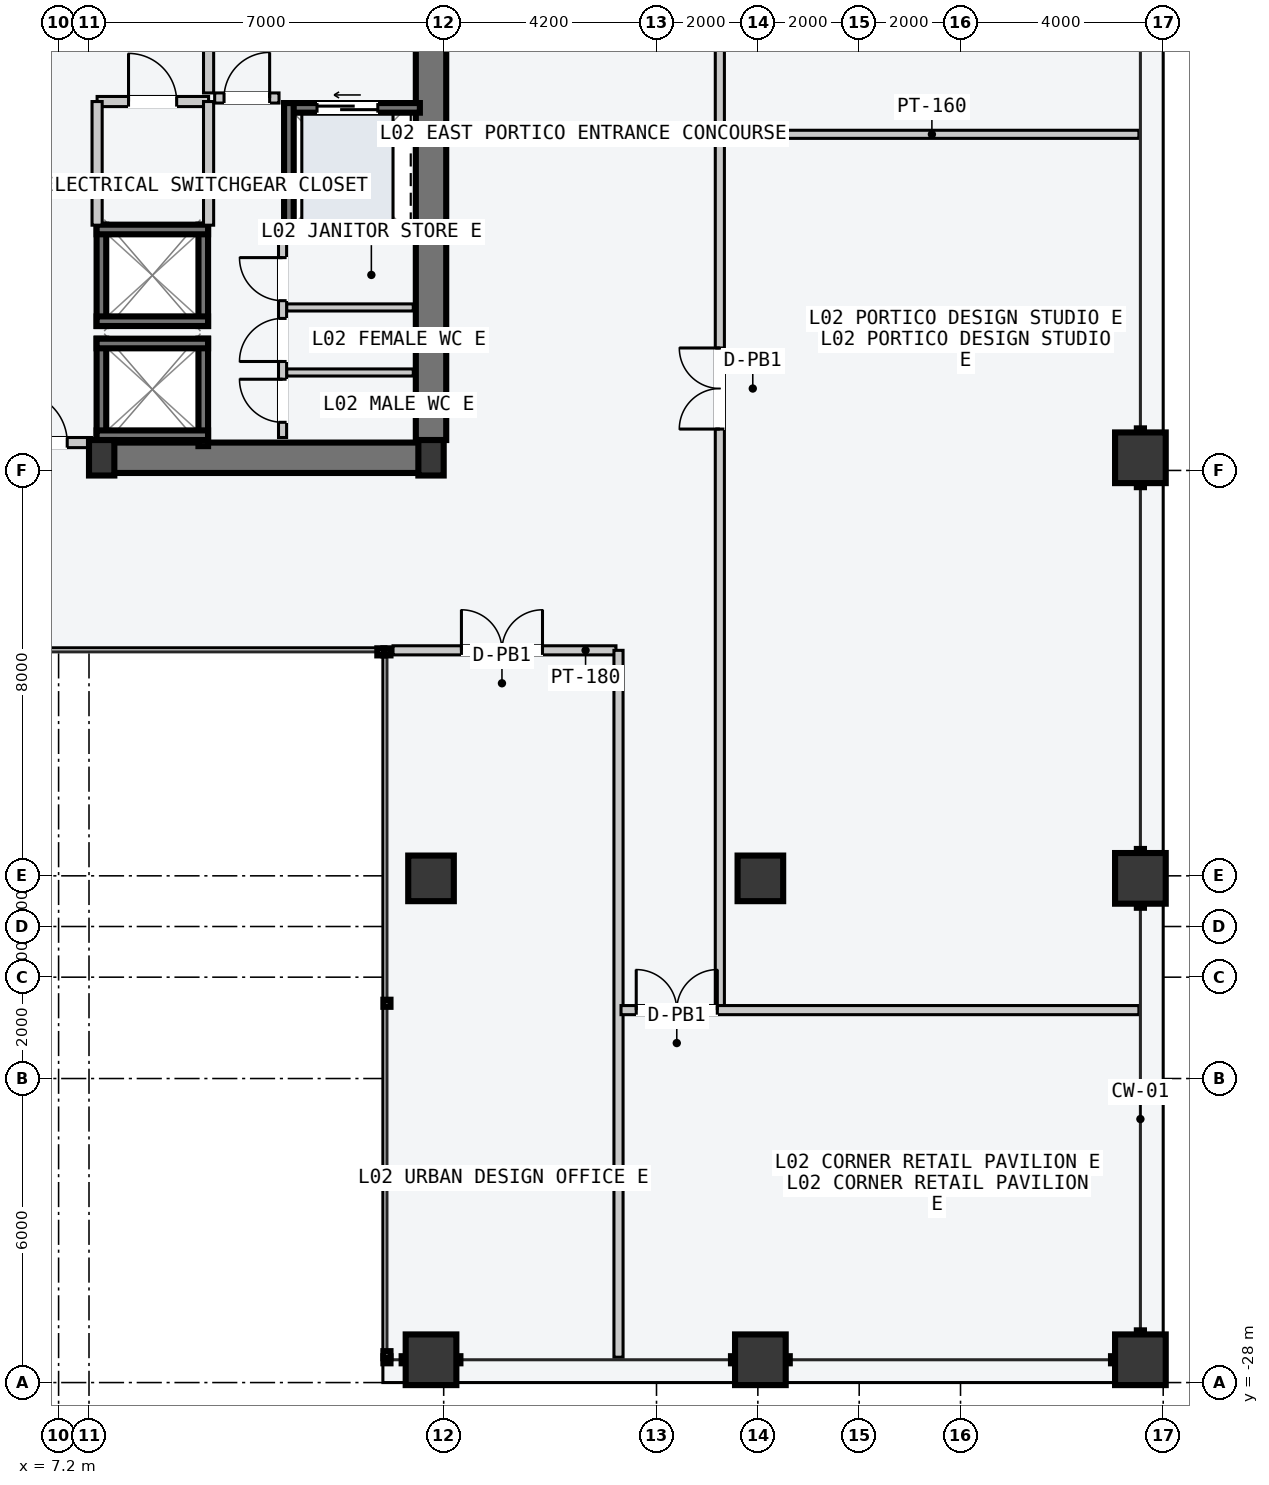
"""IFC4 building model, lengths in metres.
Left out: names, types, materials, properties, quantities, classifications, styles, units other than length and angle.
Written with IfcOpenShell. Run it as: python <this file> out.ifc"""

import sys

from ifc_helpers import new_model, si_unit, direction, frame, frame_2d, origin, origin_2d, place, context, subcontext, project, spatial, rectangle, hollow_rectangle, i_section, extrude, element, fill, save


model = new_model("IFC4")
c1 = context("Model", 3, precision=1e-05, world=origin(), true_north=direction((0.0, 1.0)))
c2 = subcontext(c1, "Body", "Model", "MODEL_VIEW")
j1 = project(units=[si_unit("LENGTHUNIT", "METRE"), si_unit("PLANEANGLEUNIT", "RADIAN")], contexts=[c1])
p1 = place(None, origin())
s1 = spatial("IfcSite", under=j1, at=p1, CompositionType="ELEMENT")
p2 = place(p1, origin())
s2 = spatial("IfcBuilding", under=s1, at=p2, CompositionType="ELEMENT")
p3 = place(p2, frame((0.0, 0.0, 9.6)))
s3 = spatial("IfcBuildingStorey", under=s2, at=p3, CompositionType="ELEMENT", Elevation=9.6)
p4 = place(p3, frame((8.07, -9.75, -0.22), z_axis=(0.0, 0.0, 1.0), x_axis=(1.0, 0.0, 0.0)))
e1 = element("IfcWall", 1, at=p4, inside=s3, PredefinedType="SHEAR", context=c2, shape_type="SweptSolid", body=[
    extrude(rectangle(XDim=6.46, YDim=0.6, at=frame_2d((3.23, 0.0))), origin(), (0.0, 0.0, 1.0), 4.8),
])
p5 = place(p3, frame((14.55, -9.4, -0.22), z_axis=(0.0, 0.0, 1.0), x_axis=(0.0, 1.0, 0.0)))
e2 = element("IfcWall", 2, at=p5, inside=s3, PredefinedType="SHEAR", context=c2, shape_type="SweptSolid", body=[
    extrude(rectangle(XDim=9.05, YDim=0.6, at=frame_2d((4.525, 0.0))), origin(), (0.0, 0.0, 1.0), 4.8),
])
for number, where, z_axis, x_axis in (
    (3, (8.05, -9.75, 0.0), (0.0, 0.0, 1.0), (1.0, 0.0, 0.0)),
    (4, (14.55, -9.75, 0.0), (0.0, 0.0, 1.0), (1.0, 0.0, 0.0)),
):
    element("IfcColumn", number, at=place(p3, frame(where, z_axis=z_axis, x_axis=x_axis)), inside=s3, PredefinedType="COLUMN", context=c2, shape_type="SweptSolid", body=[
        extrude(i_section(OverallWidth=0.5, OverallDepth=0.7, WebThickness=0.028, FlangeThickness=0.045, at=origin_2d()), origin(), (0.0, 0.0, 1.0), 4.8),
    ])
for number, where, z_axis, x_axis in (
    (5, (14.55, -18.05, 0.0), (0.0, 0.0, 1.0), (1.0, 0.0, 0.0)),
    (6, (21.05, -18.05, 0.0), (0.0, 0.0, 1.0), (1.0, 0.0, 0.0)),
):
    element("IfcColumn", number, at=place(p3, frame(where, z_axis=z_axis, x_axis=x_axis)), inside=s3, PredefinedType="COLUMN", context=c2, shape_type="SweptSolid", body=[
        extrude(hollow_rectangle(XDim=0.9, YDim=0.9, WallThickness=0.045, at=origin_2d()), origin(), (0.0, 0.0, 1.0), 4.8),
    ])
for number, where, z_axis, x_axis in (
    (7, (14.55, -27.55, 0.0), (0.0, 0.0, 1.0), (1.0, 0.0, 0.0)),
    (8, (21.05, -27.55, 0.0), (0.0, 0.0, 1.0), (1.0, 0.0, 0.0)),
    (9, (28.55, -27.55, 0.0), (0.0, 0.0, 1.0), (1.0, 0.0, 0.0)),
    (10, (28.55, -18.05, 0.0), (0.0, 0.0, 1.0), (0.0, 1.0, 0.0)),
    (11, (28.55, -9.75, 0.0), (0.0, 0.0, 1.0), (0.0, 1.0, 0.0)),
):
    element("IfcColumn", number, at=place(p3, frame(where, z_axis=z_axis, x_axis=x_axis)), inside=s3, PredefinedType="COLUMN", context=c2, shape_type="SweptSolid", body=[
        extrude(hollow_rectangle(XDim=1.0, YDim=1.0, WallThickness=0.05, at=origin_2d()), origin(), (0.0, 0.0, 1.0), 4.8),
    ])
for number, where, z_axis, x_axis in (
    (12, (8.045, -9.52, -0.22), (0.0, 0.0, 1.0), (0.0, 1.0, 0.0)),
    (13, (10.055, -9.52, -0.22), (0.0, 0.0, 1.0), (0.0, 1.0, 0.0)),
):
    element("IfcWall", number, at=place(p3, frame(where, z_axis=z_axis, x_axis=x_axis)), inside=s3, PredefinedType="SOLIDWALL", context=c2, shape_type="SweptSolid", body=[
        extrude(rectangle(XDim=2.12, YDim=0.19, at=frame_2d((1.06, 0.0))), origin(), (0.0, 0.0, 1.0), 4.8),
    ])
for number, where, z_axis, x_axis in (
    (14, (7.95, -7.495, -0.22), (0.0, 0.0, 1.0), (1.0, 0.0, 0.0)),
    (15, (7.95, -9.305, -0.22), (0.0, 0.0, 1.0), (1.0, 0.0, 0.0)),
):
    element("IfcWall", number, at=place(p3, frame(where, z_axis=z_axis, x_axis=x_axis)), inside=s3, PredefinedType="SOLIDWALL", context=c2, shape_type="SweptSolid", body=[
        extrude(rectangle(XDim=2.2, YDim=0.19, at=frame_2d((1.1, 0.0))), origin(), (0.0, 0.0, 1.0), 4.8),
    ])
for number, where, z_axis, x_axis in (
    (16, (8.045, -7.15, -0.22), (0.0, 0.0, 1.0), (0.0, 1.0, 0.0)),
    (17, (10.055, -7.15, -0.22), (0.0, 0.0, 1.0), (0.0, 1.0, 0.0)),
):
    element("IfcWall", number, at=place(p3, frame(where, z_axis=z_axis, x_axis=x_axis)), inside=s3, PredefinedType="SOLIDWALL", context=c2, shape_type="SweptSolid", body=[
        extrude(rectangle(XDim=2.0, YDim=0.19, at=frame_2d((1.0, 0.0))), origin(), (0.0, 0.0, 1.0), 4.8),
    ])
for number, where, z_axis, x_axis in (
    (18, (7.95, -5.245, -0.22), (0.0, 0.0, 1.0), (1.0, 0.0, 0.0)),
    (19, (7.95, -7.055, -0.22), (0.0, 0.0, 1.0), (1.0, 0.0, 0.0)),
):
    element("IfcWall", number, at=place(p3, frame(where, z_axis=z_axis, x_axis=x_axis)), inside=s3, PredefinedType="SOLIDWALL", context=c2, shape_type="SweptSolid", body=[
        extrude(rectangle(XDim=2.2, YDim=0.19, at=frame_2d((1.1, 0.0))), origin(), (0.0, 0.0, 1.0), 4.8),
    ])
p6 = place(p3, frame((11.65, -2.845, -0.22), z_axis=(0.0, 0.0, 1.0), x_axis=(1.0, 0.0, 0.0)))
e20 = element("IfcWall", 20, at=p6, inside=s3, PredefinedType="SOLIDWALL", context=c2, shape_type="SweptSolid", body=[
    extrude(rectangle(XDim=2.68, YDim=0.19, at=frame_2d((1.34, 0.0))), origin(), (0.0, 0.0, 1.0), 4.8),
])
p7 = place(p6, frame((0.65, 0.0, 0.22)))
e21 = element("IfcOpeningElement", 21, at=p7, cuts=e20, PredefinedType="OPENING", context=c2, shape_type="SweptSolid", body=[
    extrude(rectangle(XDim=1.2, YDim=2.2, at=frame_2d((0.6, 1.1))), frame((0.0, 0.105, 0.0), z_axis=(0.0, -1.0, 0.0), x_axis=(1.0, 0.0, 0.0)), (0.0, 0.0, 1.0), 0.21),
])
p8 = place(p3, frame((11.65, -5.255, -0.22), z_axis=(0.0, 0.0, 1.0), x_axis=(1.0, 0.0, 0.0)))
e22 = element("IfcWall", 22, at=p8, inside=s3, PredefinedType="SOLIDWALL", context=c2, shape_type="SweptSolid", body=[
    extrude(rectangle(XDim=2.68, YDim=0.19, at=frame_2d((1.34, 0.0))), origin(), (0.0, 0.0, 1.0), 4.8),
])
p9 = place(p3, frame((11.745, -5.35, -0.22), z_axis=(0.0, 0.0, 1.0), x_axis=(0.0, 1.0, 0.0)))
e23 = element("IfcWall", 23, at=p9, inside=s3, PredefinedType="SOLIDWALL", context=c2, shape_type="SweptSolid", body=[
    extrude(rectangle(XDim=2.6, YDim=0.19, at=frame_2d((1.3, 0.0))), origin(), (0.0, 0.0, 1.0), 4.8),
])
p10 = place(p3, frame((10.16, -2.55, 0.0), z_axis=(0.0, 0.0, 1.0), x_axis=(0.0, 1.0, 0.0)))
e24 = element("IfcWall", 24, at=p10, inside=s3, PredefinedType="PARTITIONING", context=c2, shape_type="SweptSolid", body=[
    extrude(rectangle(XDim=3.4, YDim=0.2, at=frame_2d((1.7, 0.0))), origin(), (0.0, 0.0, 1.0), 4.58),
])
p11 = place(p10, frame((1.3, 0.0, 0.0)))
e25 = element("IfcOpeningElement", 25, at=p11, cuts=e24, PredefinedType="OPENING", context=c2, shape_type="SweptSolid", body=[
    extrude(rectangle(XDim=1.1, YDim=2.15, at=frame_2d((0.55, 1.075))), frame((0.0, 0.11, 0.0), z_axis=(0.0, -1.0, 0.0), x_axis=(1.0, 0.0, 0.0)), (0.0, 0.0, 1.0), 0.22),
])
p12 = place(p3, frame((10.28, -2.65, 0.0), z_axis=(0.0, 0.0, 1.0), x_axis=(1.0, 0.0, 0.0)))
e26 = element("IfcWall", 26, at=p12, inside=s3, PredefinedType="PARTITIONING", context=c2, shape_type="SweptSolid", body=[
    extrude(rectangle(XDim=1.27, YDim=0.2, at=frame_2d((0.635, 0.0))), origin(), (0.0, 0.0, 1.0), 4.58),
])
p13 = place(p12, frame((0.185, 0.0, 0.0)))
e27 = element("IfcOpeningElement", 27, at=p13, cuts=e26, PredefinedType="OPENING", context=c2, shape_type="SweptSolid", body=[
    extrude(rectangle(XDim=0.9, YDim=2.15, at=frame_2d((0.45, 1.075))), frame((0.0, 0.11, 0.0), z_axis=(0.0, -1.0, 0.0), x_axis=(1.0, 0.0, 0.0)), (0.0, 0.0, 1.0), 0.22),
])
p14 = place(p3, frame((7.96, -2.72, 0.0), z_axis=(0.0, 0.0, 1.0), x_axis=(1.0, 0.0, 0.0)))
e28 = element("IfcWall", 28, at=p14, inside=s3, PredefinedType="PARTITIONING", context=c2, shape_type="SweptSolid", body=[
    extrude(rectangle(XDim=2.2, YDim=0.2, at=frame_2d((1.1, 0.0))), origin(), (0.0, 0.0, 1.0), 4.58),
])
p15 = place(p14, frame((0.62, 0.0, 0.0)))
e29 = element("IfcOpeningElement", 29, at=p15, cuts=e28, PredefinedType="OPENING", context=c2, shape_type="SweptSolid", body=[
    extrude(rectangle(XDim=0.95, YDim=2.1, at=frame_2d((0.475, 1.05))), frame((0.0, 0.11, 0.0), z_axis=(0.0, -1.0, 0.0), x_axis=(1.0, 0.0, 0.0)), (0.0, 0.0, 1.0), 0.22),
])
for number, where, z_axis, x_axis in (
    (30, (7.96, -5.16, 0.0), (0.0, 0.0, 1.0), (0.0, 1.0, 0.0)),
    (31, (10.16, -5.16, 0.0), (0.0, 0.0, 1.0), (0.0, 1.0, 0.0)),
):
    element("IfcWall", number, at=place(p3, frame(where, z_axis=z_axis, x_axis=x_axis)), inside=s3, PredefinedType="PARTITIONING", context=c2, shape_type="SweptSolid", body=[
        extrude(rectangle(XDim=2.44, YDim=0.2, at=frame_2d((1.22, 0.0))), origin(), (0.0, 0.0, 1.0), 4.58),
    ])
for number, where, z_axis, x_axis in (
    (32, (11.7, -8.067, 0.0), (0.0, 0.0, 1.0), (1.0, 0.0, 0.0)),
    (33, (11.7, -6.783, 0.0), (0.0, 0.0, 1.0), (1.0, 0.0, 0.0)),
):
    element("IfcWall", number, at=place(p3, frame(where, z_axis=z_axis, x_axis=x_axis)), inside=s3, PredefinedType="PARTITIONING", context=c2, shape_type="SweptSolid", body=[
        extrude(rectangle(XDim=2.5, YDim=0.14, at=frame_2d((1.25, 0.0))), origin(), (0.0, 0.0, 1.0), 4.58),
    ])
p16 = place(p3, frame((11.62, -9.35, 0.0), z_axis=(0.0, 0.0, 1.0), x_axis=(0.0, 1.0, 0.0)))
e34 = element("IfcWall", 34, at=p16, inside=s3, PredefinedType="PARTITIONING", context=c2, shape_type="SweptSolid", body=[
    extrude(rectangle(XDim=3.85, YDim=0.16, at=frame_2d((1.925, 0.0))), origin(), (0.0, 0.0, 1.0), 4.58),
])
p17 = place(p16, frame((0.3, 0.0, 0.0)))
e35 = element("IfcOpeningElement", 35, at=p17, cuts=e34, PredefinedType="OPENING", context=c2, shape_type="SweptSolid", body=[
    extrude(rectangle(XDim=0.85, YDim=2.12, at=frame_2d((0.425, 1.06))), frame((0.0, 0.09, 0.0), z_axis=(0.0, -1.0, 0.0), x_axis=(1.0, 0.0, 0.0)), (0.0, 0.0, 1.0), 0.18),
])
p18 = place(p16, frame((1.5, 0.0, 0.0)))
e36 = element("IfcOpeningElement", 36, at=p18, cuts=e34, PredefinedType="OPENING", context=c2, shape_type="SweptSolid", body=[
    extrude(rectangle(XDim=0.85, YDim=2.12, at=frame_2d((0.425, 1.06))), frame((0.0, 0.09, 0.0), z_axis=(0.0, -1.0, 0.0), x_axis=(1.0, 0.0, 0.0)), (0.0, 0.0, 1.0), 0.18),
])
p19 = place(p16, frame((2.7, 0.0, 0.0)))
e37 = element("IfcOpeningElement", 37, at=p19, cuts=e34, PredefinedType="OPENING", context=c2, shape_type="SweptSolid", body=[
    extrude(rectangle(XDim=0.85, YDim=2.12, at=frame_2d((0.425, 1.06))), frame((0.0, 0.09, 0.0), z_axis=(0.0, -1.0, 0.0), x_axis=(1.0, 0.0, 0.0)), (0.0, 0.0, 1.0), 0.18),
])
p20 = place(p3, frame((5.92, -9.45, 0.0), z_axis=(0.0, 0.0, 1.0), x_axis=(1.0, 0.0, 0.0)))
e38 = element("IfcWall", 38, at=p20, inside=s3, PredefinedType="PARTITIONING", context=c2, shape_type="SweptSolid", body=[
    extrude(rectangle(XDim=1.93, YDim=0.2, at=frame_2d((0.965, 0.0))), origin(), (0.0, 0.0, 1.0), 2.63),
])
p21 = place(p20, frame((0.45, 0.0, 0.0)))
e39 = element("IfcOpeningElement", 39, at=p21, cuts=e38, PredefinedType="OPENING", context=c2, shape_type="SweptSolid", body=[
    extrude(rectangle(XDim=1.0, YDim=2.15, at=frame_2d((0.5, 1.075))), frame((0.0, 0.11, 0.0), z_axis=(0.0, -1.0, 0.0), x_axis=(1.0, 0.0, 0.0)), (0.0, 0.0, 1.0), 0.22),
])
p22 = place(p3, frame((20.35, -3.367, 0.0), z_axis=(0.0, 0.0, 1.0), x_axis=(1.0, 0.0, 0.0)))
e40 = element("IfcWall", 40, at=p22, inside=s3, PredefinedType="PARTITIONING", context=c2, shape_type="SweptSolid", body=[
    extrude(rectangle(XDim=8.17, YDim=0.16, at=frame_2d((4.085, 0.0))), origin(), (0.0, 0.0, 1.0), 4.08),
])
p23 = place(p3, frame((20.25, -20.6, 0.0), z_axis=(0.0, 0.0, 1.0), x_axis=(0.0, 1.0, 0.0)))
e41 = element("IfcWall", 41, at=p23, inside=s3, PredefinedType="PARTITIONING", context=c2, shape_type="SweptSolid", body=[
    extrude(rectangle(XDim=37.3, YDim=0.18, at=frame_2d((18.65, 0.0))), origin(), (0.0, 0.0, 1.0), 4.58),
])
p24 = place(p23, frame((11.417, 0.0, 0.0)))
e42 = element("IfcOpeningElement", 42, at=p24, cuts=e41, PredefinedType="OPENING", context=c2, shape_type="SweptSolid", body=[
    extrude(rectangle(XDim=1.6, YDim=2.3, at=frame_2d((0.8, 1.15))), frame((0.0, 0.1, 0.0), z_axis=(0.0, -1.0, 0.0), x_axis=(1.0, 0.0, 0.0)), (0.0, 0.0, 1.0), 0.2),
])
p25 = place(p23, frame((21.45, 0.0, 0.0)))
e43 = element("IfcOpeningElement", 43, at=p25, cuts=e41, PredefinedType="OPENING", context=c2, shape_type="SweptSolid", body=[
    extrude(rectangle(XDim=1.6, YDim=2.3, at=frame_2d((0.8, 1.15))), frame((0.0, 0.1, 0.0), z_axis=(0.0, -1.0, 0.0), x_axis=(1.0, 0.0, 0.0)), (0.0, 0.0, 1.0), 0.2),
])
p26 = place(p23, frame((31.483, 0.0, 0.0)))
e44 = element("IfcOpeningElement", 44, at=p26, cuts=e41, PredefinedType="OPENING", context=c2, shape_type="SweptSolid", body=[
    extrude(rectangle(XDim=1.6, YDim=2.3, at=frame_2d((0.8, 1.15))), frame((0.0, 0.1, 0.0), z_axis=(0.0, -1.0, 0.0), x_axis=(1.0, 0.0, 0.0)), (0.0, 0.0, 1.0), 0.2),
])
p27 = place(p3, frame((13.8, -13.55, 0.0), z_axis=(0.0, 0.0, 1.0), x_axis=(1.0, 0.0, 0.0)))
e45 = element("IfcWall", 45, at=p27, inside=s3, PredefinedType="PARTITIONING", context=c2, shape_type="SweptSolid", body=[
    extrude(rectangle(XDim=4.4, YDim=0.18, at=frame_2d((2.2, 0.0))), origin(), (0.0, 0.0, 1.0), 4.58),
])
p28 = place(p27, frame((1.35, 0.0, 0.0)))
e46 = element("IfcOpeningElement", 46, at=p28, cuts=e45, PredefinedType="OPENING", context=c2, shape_type="SweptSolid", body=[
    extrude(rectangle(XDim=1.6, YDim=2.3, at=frame_2d((0.8, 1.15))), frame((0.0, 0.1, 0.0), z_axis=(0.0, -1.0, 0.0), x_axis=(1.0, 0.0, 0.0)), (0.0, 0.0, 1.0), 0.2),
])
p29 = place(p3, frame((18.25, -27.5, 0.0), z_axis=(0.0, 0.0, 1.0), x_axis=(0.0, 1.0, 0.0)))
e47 = element("IfcWall", 47, at=p29, inside=s3, PredefinedType="PARTITIONING", context=c2, shape_type="SweptSolid", body=[
    extrude(rectangle(XDim=13.95, YDim=0.18, at=frame_2d((6.975, 0.0))), origin(), (0.0, 0.0, 1.0), 4.58),
])
p30 = place(p3, frame((18.3, -20.65, 0.0), z_axis=(0.0, 0.0, 1.0), x_axis=(1.0, 0.0, 0.0)))
e48 = element("IfcWall", 48, at=p30, inside=s3, PredefinedType="PARTITIONING", context=c2, shape_type="SweptSolid", body=[
    extrude(rectangle(XDim=10.22, YDim=0.18, at=frame_2d((5.11, 0.0))), origin(), (0.0, 0.0, 1.0), 4.58),
])
p31 = place(p30, frame((0.3, 0.0, 0.0)))
e49 = element("IfcOpeningElement", 49, at=p31, cuts=e48, PredefinedType="OPENING", context=c2, shape_type="SweptSolid", body=[
    extrude(rectangle(XDim=1.6, YDim=2.3, at=frame_2d((0.8, 1.15))), frame((0.0, 0.1, 0.0), z_axis=(0.0, -1.0, 0.0), x_axis=(1.0, 0.0, 0.0)), (0.0, 0.0, 1.0), 0.2),
])
p32 = place(p7, origin())
e50 = element("IfcDoor", 50, at=p32, inside=s3, OperationType="SLIDING_TO_LEFT", PredefinedType="DOOR", context=c2, shape_type="SweptSolid", body=[
    extrude(rectangle(XDim=1.2, YDim=2.2, at=frame_2d((0.6, 1.1))), frame((0.0, 0.025, 0.0), z_axis=(0.0, -1.0, 0.0), x_axis=(1.0, 0.0, 0.0)), (0.0, 0.0, 1.0), 0.05),
])
fill(e21, e50)
p33 = place(p13, origin())
e51 = element("IfcDoor", 51, at=p33, inside=s3, OperationType="SINGLE_SWING_RIGHT", PredefinedType="DOOR", context=c2, shape_type="SweptSolid", body=[
    extrude(rectangle(XDim=0.9, YDim=2.15, at=frame_2d((0.45, 1.075))), frame((0.0, 0.025, 0.0), z_axis=(0.0, -1.0, 0.0), x_axis=(1.0, 0.0, 0.0)), (0.0, 0.0, 1.0), 0.05),
])
fill(e27, e51)
p34 = place(p15, origin())
e52 = element("IfcDoor", 52, at=p34, inside=s3, OperationType="SINGLE_SWING_LEFT", PredefinedType="DOOR", context=c2, shape_type="SweptSolid", body=[
    extrude(rectangle(XDim=0.95, YDim=2.1, at=frame_2d((0.475, 1.05))), frame((0.0, 0.025, 0.0), z_axis=(0.0, -1.0, 0.0), x_axis=(1.0, 0.0, 0.0)), (0.0, 0.0, 1.0), 0.05),
])
fill(e29, e52)
p35 = place(p17, origin())
e53 = element("IfcDoor", 53, at=p35, inside=s3, OperationType="SINGLE_SWING_RIGHT", PredefinedType="DOOR", context=c2, shape_type="SweptSolid", body=[
    extrude(rectangle(XDim=0.85, YDim=2.12, at=frame_2d((0.425, 1.06))), frame((0.0, 0.025, 0.0), z_axis=(0.0, -1.0, 0.0), x_axis=(1.0, 0.0, 0.0)), (0.0, 0.0, 1.0), 0.05),
])
fill(e35, e53)
p36 = place(p18, origin())
e54 = element("IfcDoor", 54, at=p36, inside=s3, OperationType="SINGLE_SWING_LEFT", PredefinedType="DOOR", context=c2, shape_type="SweptSolid", body=[
    extrude(rectangle(XDim=0.85, YDim=2.12, at=frame_2d((0.425, 1.06))), frame((0.0, 0.025, 0.0), z_axis=(0.0, -1.0, 0.0), x_axis=(1.0, 0.0, 0.0)), (0.0, 0.0, 1.0), 0.05),
])
fill(e36, e54)
p37 = place(p19, origin())
e55 = element("IfcDoor", 55, at=p37, inside=s3, OperationType="SINGLE_SWING_RIGHT", PredefinedType="DOOR", context=c2, shape_type="SweptSolid", body=[
    extrude(rectangle(XDim=0.85, YDim=2.12, at=frame_2d((0.425, 1.06))), frame((0.0, 0.025, 0.0), z_axis=(0.0, -1.0, 0.0), x_axis=(1.0, 0.0, 0.0)), (0.0, 0.0, 1.0), 0.05),
])
fill(e37, e55)
p38 = place(p21, origin())
e56 = element("IfcDoor", 56, at=p38, inside=s3, OperationType="SINGLE_SWING_LEFT", PredefinedType="DOOR", context=c2, shape_type="SweptSolid", body=[
    extrude(rectangle(XDim=1.0, YDim=2.15, at=frame_2d((0.5, 1.075))), frame((0.0, 0.025, 0.0), z_axis=(0.0, -1.0, 0.0), x_axis=(1.0, 0.0, 0.0)), (0.0, 0.0, 1.0), 0.05),
])
fill(e39, e56)
p39 = place(p24, origin())
e57 = element("IfcDoor", 57, at=p39, inside=s3, OperationType="DOUBLE_DOOR_SINGLE_SWING", PredefinedType="DOOR", context=c2, shape_type="SweptSolid", body=[
    extrude(rectangle(XDim=1.6, YDim=2.3, at=frame_2d((0.8, 1.15))), frame((0.0, 0.025, 0.0), z_axis=(0.0, -1.0, 0.0), x_axis=(1.0, 0.0, 0.0)), (0.0, 0.0, 1.0), 0.05),
])
fill(e42, e57)
p40 = place(p28, origin())
e58 = element("IfcDoor", 58, at=p40, inside=s3, OperationType="DOUBLE_DOOR_SINGLE_SWING", PredefinedType="DOOR", context=c2, shape_type="SweptSolid", body=[
    extrude(rectangle(XDim=1.6, YDim=2.3, at=frame_2d((0.8, 1.15))), frame((0.0, 0.025, 0.0), z_axis=(0.0, -1.0, 0.0), x_axis=(1.0, 0.0, 0.0)), (0.0, 0.0, 1.0), 0.05),
])
fill(e46, e58)
p41 = place(p31, origin())
e59 = element("IfcDoor", 59, at=p41, inside=s3, OperationType="DOUBLE_DOOR_SINGLE_SWING", PredefinedType="DOOR", context=c2, shape_type="SweptSolid", body=[
    extrude(rectangle(XDim=1.6, YDim=2.3, at=frame_2d((0.8, 1.15))), frame((0.0, 0.025, 0.0), z_axis=(0.0, -1.0, 0.0), x_axis=(1.0, 0.0, 0.0)), (0.0, 0.0, 1.0), 0.05),
])
fill(e49, e59)
save(model, sys.argv[1])
